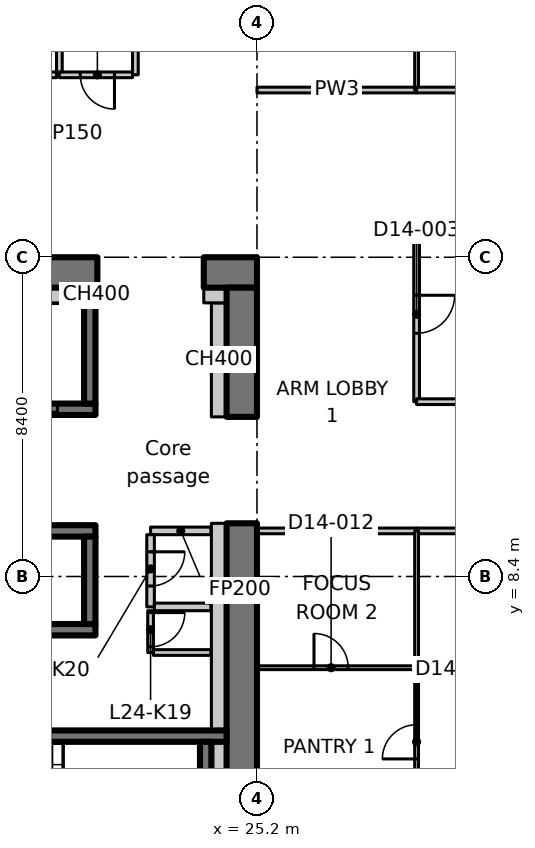
"""IFC4 building model, lengths in metres.
Left out: names, types, materials, properties, quantities, classifications, styles, units other than length and angle.
Written with IfcOpenShell. Run it as: python <this file> out.ifc"""

import sys

from ifc_helpers import new_model, si_unit, direction, frame, frame_2d, origin, place, context, subcontext, project, spatial, polyline, rectangle, outline, extrude, element, fill, save


model = new_model("IFC4")
c1 = context("Model", 3, precision=1e-05, world=origin(), true_north=direction((0.0, 1.0)))
c2 = subcontext(c1, "Body", "Model", "MODEL_VIEW")
j1 = project(units=[si_unit("LENGTHUNIT", "METRE"), si_unit("PLANEANGLEUNIT", "RADIAN")], contexts=[c1])
p1 = place(None, origin())
s1 = spatial("IfcSite", under=j1, at=p1, CompositionType="ELEMENT")
p2 = place(p1, origin())
s2 = spatial("IfcBuilding", under=s1, at=p2, CompositionType="ELEMENT")
p3 = place(p2, frame((0.0, 0.0, 102.5)))
s3 = spatial("IfcBuildingStorey", under=s2, at=p3, CompositionType="ELEMENT", Elevation=102.5)
p4 = place(p3, frame((-1.1, 16.4, 0.0), z_axis=(0.0, 0.0, 1.0), x_axis=(1.0, 0.0, 0.0)))
e1 = element("IfcWall", 1, at=p4, inside=s3, PredefinedType="SHEAR", context=c2, shape_type="SweptSolid", body=[
    extrude(rectangle(XDim=22.1, YDim=0.8, at=frame_2d((11.05, 0.0))), origin(), (0.0, 0.0, 1.0), 3.35),
])
p5 = place(p4, frame((3.15, 0.0, 0.0)))
e2 = element("IfcOpeningElement", 2, at=p5, cuts=e1, PredefinedType="OPENING", context=c2, shape_type="SweptSolid", body=[
    extrude(rectangle(XDim=1.1, YDim=2.3, at=frame_2d((0.55, 1.15))), frame((0.0, 0.41, 0.0), z_axis=(0.0, -1.0, 0.0), x_axis=(1.0, 0.0, 0.0)), (0.0, 0.0, 1.0), 0.82),
])
p6 = place(p3, frame((23.8, 16.4, 0.0), z_axis=(0.0, 0.0, 1.0), x_axis=(1.0, 0.0, 0.0)))
e3 = element("IfcWall", 3, at=p6, inside=s3, PredefinedType="SHEAR", context=c2, shape_type="SweptSolid", body=[
    extrude(rectangle(XDim=1.4, YDim=0.8, at=frame_2d((0.7, 0.0))), origin(), (0.0, 0.0, 1.0), 3.35),
])
p7 = place(p3, frame((24.8, 0.8, 0.0), z_axis=(0.0, 0.0, 1.0), x_axis=(0.0, 1.0, 0.0)))
e4 = element("IfcWall", 4, at=p7, inside=s3, PredefinedType="SHEAR", context=c2, shape_type="SweptSolid", body=[
    extrude(rectangle(XDim=9.0, YDim=0.8, at=frame_2d((4.5, 0.0))), origin(), (0.0, 0.0, 1.0), 3.35),
])
p8 = place(p3, frame((24.8, 12.6, 0.0), z_axis=(0.0, 0.0, 1.0), x_axis=(0.0, 1.0, 0.0)))
e5 = element("IfcWall", 5, at=p8, inside=s3, PredefinedType="SHEAR", context=c2, shape_type="SweptSolid", body=[
    extrude(rectangle(XDim=3.4, YDim=0.8, at=frame_2d((1.7, 0.0))), origin(), (0.0, 0.0, 1.0), 3.35),
])
p9 = place(p3, frame((24.2, 12.6, 0.0), z_axis=(0.0, 0.0, 1.0), x_axis=(0.0, 1.0, 0.0)))
e6 = element("IfcWall", 6, at=p9, inside=s3, PredefinedType="PARTITIONING", context=c2, shape_type="SweptSolid", body=[
    extrude(rectangle(XDim=3.0, YDim=0.4, at=frame_2d((1.5, 0.0))), origin(), (0.0, 0.0, 1.0), 3.35),
])
p10 = place(p3, frame((23.8, 15.8, 0.0), z_axis=(0.0, 0.0, 1.0), x_axis=(1.0, 0.0, 0.0)))
e7 = element("IfcWall", 7, at=p10, inside=s3, PredefinedType="PARTITIONING", context=c2, shape_type="SweptSolid", body=[
    extrude(rectangle(XDim=0.6, YDim=0.4, at=frame_2d((0.3, 0.0))), origin(), (0.0, 0.0, 1.0), 3.35),
])
p11 = place(p3, frame((0.8, 7.0, 0.0), z_axis=(0.0, 0.0, 1.0), x_axis=(1.0, 0.0, 0.0)))
e8 = element("IfcWall", 8, at=p11, inside=s3, PredefinedType="SHEAR", context=c2, shape_type="SweptSolid", body=[
    extrude(rectangle(XDim=20.15, YDim=0.3, at=frame_2d((10.075, 0.0))), origin(), (0.0, 0.0, 1.0), 3.35),
])
p12 = place(p3, frame((0.8, 9.6, 0.0), z_axis=(0.0, 0.0, 1.0), x_axis=(1.0, 0.0, 0.0)))
e9 = element("IfcWall", 9, at=p12, inside=s3, PredefinedType="SHEAR", context=c2, shape_type="SweptSolid", body=[
    extrude(rectangle(XDim=20.15, YDim=0.3, at=frame_2d((10.075, 0.0))), origin(), (0.0, 0.0, 1.0), 3.35),
])
p13 = place(p12, frame((1.25, 0.0, 0.0)))
e10 = element("IfcOpeningElement", 10, at=p13, cuts=e9, PredefinedType="OPENING", context=c2, shape_type="SweptSolid", body=[
    extrude(rectangle(XDim=1.1, YDim=2.3, at=frame_2d((0.55, 1.15))), frame((0.0, 0.16, 0.0), z_axis=(0.0, -1.0, 0.0), x_axis=(1.0, 0.0, 0.0)), (0.0, 0.0, 1.0), 0.32),
])
p14 = place(p12, frame((4.05, 0.0, 0.0)))
e11 = element("IfcOpeningElement", 11, at=p14, cuts=e9, PredefinedType="OPENING", context=c2, shape_type="SweptSolid", body=[
    extrude(rectangle(XDim=1.1, YDim=2.3, at=frame_2d((0.55, 1.15))), frame((0.0, 0.16, 0.0), z_axis=(0.0, -1.0, 0.0), x_axis=(1.0, 0.0, 0.0)), (0.0, 0.0, 1.0), 0.32),
])
p15 = place(p12, frame((6.85, 0.0, 0.0)))
e12 = element("IfcOpeningElement", 12, at=p15, cuts=e9, PredefinedType="OPENING", context=c2, shape_type="SweptSolid", body=[
    extrude(rectangle(XDim=1.1, YDim=2.3, at=frame_2d((0.55, 1.15))), frame((0.0, 0.16, 0.0), z_axis=(0.0, -1.0, 0.0), x_axis=(1.0, 0.0, 0.0)), (0.0, 0.0, 1.0), 0.32),
])
p16 = place(p12, frame((9.65, 0.0, 0.0)))
e13 = element("IfcOpeningElement", 13, at=p16, cuts=e9, PredefinedType="OPENING", context=c2, shape_type="SweptSolid", body=[
    extrude(rectangle(XDim=1.1, YDim=2.3, at=frame_2d((0.55, 1.15))), frame((0.0, 0.16, 0.0), z_axis=(0.0, -1.0, 0.0), x_axis=(1.0, 0.0, 0.0)), (0.0, 0.0, 1.0), 0.32),
])
p17 = place(p12, frame((12.45, 0.0, 0.0)))
e14 = element("IfcOpeningElement", 14, at=p17, cuts=e9, PredefinedType="OPENING", context=c2, shape_type="SweptSolid", body=[
    extrude(rectangle(XDim=1.1, YDim=2.3, at=frame_2d((0.55, 1.15))), frame((0.0, 0.16, 0.0), z_axis=(0.0, -1.0, 0.0), x_axis=(1.0, 0.0, 0.0)), (0.0, 0.0, 1.0), 0.32),
])
p18 = place(p12, frame((15.25, 0.0, 0.0)))
e15 = element("IfcOpeningElement", 15, at=p18, cuts=e9, PredefinedType="OPENING", context=c2, shape_type="SweptSolid", body=[
    extrude(rectangle(XDim=1.1, YDim=2.3, at=frame_2d((0.55, 1.15))), frame((0.0, 0.16, 0.0), z_axis=(0.0, -1.0, 0.0), x_axis=(1.0, 0.0, 0.0)), (0.0, 0.0, 1.0), 0.32),
])
p19 = place(p3, frame((20.8, 7.15, 0.0), z_axis=(0.0, 0.0, 1.0), x_axis=(0.0, 1.0, 0.0)))
e16 = element("IfcWall", 16, at=p19, inside=s3, PredefinedType="SHEAR", context=c2, shape_type="SweptSolid", body=[
    extrude(rectangle(XDim=2.3, YDim=0.3, at=frame_2d((1.15, 0.0))), origin(), (0.0, 0.0, 1.0), 3.35),
])
p20 = place(p3, frame((15.05, 12.8, 0.0), z_axis=(0.0, 0.0, 1.0), x_axis=(1.0, 0.0, 0.0)))
e17 = element("IfcWall", 17, at=p20, inside=s3, PredefinedType="SHEAR", context=c2, shape_type="SweptSolid", body=[
    extrude(rectangle(XDim=5.9, YDim=0.3, at=frame_2d((2.95, 0.0))), origin(), (0.0, 0.0, 1.0), 3.35),
])
p21 = place(p20, frame((3.8, 0.0, 0.0)))
e18 = element("IfcOpeningElement", 18, at=p21, cuts=e17, PredefinedType="OPENING", context=c2, shape_type="SweptSolid", body=[
    extrude(rectangle(XDim=1.1, YDim=2.3, at=frame_2d((0.55, 1.15))), frame((0.0, 0.16, 0.0), z_axis=(0.0, -1.0, 0.0), x_axis=(1.0, 0.0, 0.0)), (0.0, 0.0, 1.0), 0.32),
])
p22 = place(p3, frame((20.8, 12.95, 0.0), z_axis=(0.0, 0.0, 1.0), x_axis=(0.0, 1.0, 0.0)))
e19 = element("IfcWall", 19, at=p22, inside=s3, PredefinedType="SHEAR", context=c2, shape_type="SweptSolid", body=[
    extrude(rectangle(XDim=3.05, YDim=0.3, at=frame_2d((1.525, 0.0))), origin(), (0.0, 0.0, 1.0), 3.35),
])
p23 = place(p3, frame((15.8, 4.2, 0.0), z_axis=(0.0, 0.0, 1.0), x_axis=(1.0, 0.0, 0.0)))
e20 = element("IfcWall", 20, at=p23, inside=s3, PredefinedType="SHEAR", context=c2, shape_type="SweptSolid", body=[
    extrude(rectangle(XDim=8.6, YDim=0.3, at=frame_2d((4.3, 0.0))), origin(), (0.0, 0.0, 1.0), 3.35),
])
p24 = place(p23, frame((0.4, 0.0, 0.0)))
e21 = element("IfcOpeningElement", 21, at=p24, cuts=e20, PredefinedType="OPENING", context=c2, shape_type="SweptSolid", body=[
    extrude(rectangle(XDim=1.0, YDim=2.1, at=frame_2d((0.5, 1.05))), frame((0.0, 0.16, 0.0), z_axis=(0.0, -1.0, 0.0), x_axis=(1.0, 0.0, 0.0)), (0.0, 0.0, 1.0), 0.32),
])
p25 = place(p3, frame((23.85, 1.5, 0.0), z_axis=(0.0, 0.0, 1.0), x_axis=(0.0, 1.0, 0.0)))
e22 = element("IfcWall", 22, at=p25, inside=s3, PredefinedType="SHEAR", context=c2, shape_type="SweptSolid", body=[
    extrude(rectangle(XDim=2.55, YDim=0.3, at=frame_2d((1.275, 0.0))), origin(), (0.0, 0.0, 1.0), 3.35),
])
p26 = place(p3, frame((23.988, 9.6, 0.0), z_axis=(0.0, 0.0, 1.0), x_axis=(-1.0, 0.0, 0.0)))
e23 = element("IfcWall", 23, at=p26, inside=s3, PredefinedType="PARTITIONING", context=c2, shape_type="SweptSolid", body=[
    extrude(rectangle(XDim=1.588, YDim=0.2, at=frame_2d((0.794, 0.0))), origin(), (0.0, 0.0, 1.0), 3.35),
])
p27 = place(p3, frame((22.4, 9.5, 0.0), z_axis=(0.0, 0.0, 1.0), x_axis=(0.0, -1.0, 0.0)))
e24 = element("IfcWall", 24, at=p27, inside=s3, PredefinedType="PARTITIONING", context=c2, shape_type="SweptSolid", body=[
    extrude(rectangle(XDim=1.9, YDim=0.2, at=frame_2d((0.95, 0.0))), origin(), (0.0, 0.0, 1.0), 3.35),
])
p28 = place(p27, frame((0.45, 0.0, 0.0)))
e25 = element("IfcOpeningElement", 25, at=p28, cuts=e24, PredefinedType="OPENING", context=c2, shape_type="SweptSolid", body=[
    extrude(rectangle(XDim=0.9, YDim=2.1, at=frame_2d((0.45, 1.05))), frame((0.0, 0.11, 0.0), z_axis=(0.0, -1.0, 0.0), x_axis=(1.0, 0.0, 0.0)), (0.0, 0.0, 1.0), 0.22),
])
p29 = place(p3, frame((22.5, 7.6, 0.0), z_axis=(0.0, 0.0, 1.0), x_axis=(1.0, 0.0, 0.0)))
e26 = element("IfcWall", 26, at=p29, inside=s3, PredefinedType="PARTITIONING", context=c2, shape_type="SweptSolid", body=[
    extrude(rectangle(XDim=1.488, YDim=0.2, at=frame_2d((0.744, 0.0))), origin(), (0.0, 0.0, 1.0), 3.35),
])
p30 = place(p3, frame((22.0, 23.925, 0.0), z_axis=(0.0, 0.0, 1.0), x_axis=(0.0, -1.0, 0.0)))
e27 = element("IfcWall", 27, at=p30, inside=s3, PredefinedType="PARTITIONING", context=c2, shape_type="SweptSolid", body=[
    extrude(rectangle(XDim=2.325, YDim=0.15, at=frame_2d((1.163, 0.0))), origin(), (0.0, 0.0, 1.0), 3.35),
])
p31 = place(p3, frame((21.925, 21.6, 0.0), z_axis=(0.0, 0.0, 1.0), x_axis=(-1.0, 0.0, 0.0)))
e28 = element("IfcWall", 28, at=p31, inside=s3, PredefinedType="PARTITIONING", context=c2, shape_type="SweptSolid", body=[
    extrude(rectangle(XDim=1.925, YDim=0.15, at=frame_2d((0.962, 0.0))), origin(), (0.0, 0.0, 1.0), 3.35),
])
p32 = place(p31, frame((0.475, 0.0, 0.0)))
e29 = element("IfcOpeningElement", 29, at=p32, cuts=e28, PredefinedType="OPENING", context=c2, shape_type="SweptSolid", body=[
    extrude(rectangle(XDim=0.9, YDim=2.1, at=frame_2d((0.45, 1.05))), frame((0.0, 0.085, 0.0), z_axis=(0.0, -1.0, 0.0), x_axis=(1.0, 0.0, 0.0)), (0.0, 0.0, 1.0), 0.17),
])
p33 = place(p3, frame((20.0, 21.675, 0.0), z_axis=(0.0, 0.0, 1.0), x_axis=(0.0, 1.0, 0.0)))
e30 = element("IfcWall", 30, at=p33, inside=s3, PredefinedType="PARTITIONING", context=c2, shape_type="SweptSolid", body=[
    extrude(rectangle(XDim=2.25, YDim=0.15, at=frame_2d((1.125, 0.0))), origin(), (0.0, 0.0, 1.0), 3.35),
])
p34 = place(p3, frame((19.925, 21.6, 0.0), z_axis=(0.0, 0.0, 1.0), x_axis=(-1.0, 0.0, 0.0)))
e31 = element("IfcWall", 31, at=p34, inside=s3, PredefinedType="PARTITIONING", context=c2, shape_type="SweptSolid", body=[
    extrude(rectangle(XDim=2.325, YDim=0.15, at=frame_2d((1.163, 0.0))), origin(), (0.0, 0.0, 1.0), 3.35),
])
p35 = place(p34, frame((0.675, 0.0, 0.0)))
e32 = element("IfcOpeningElement", 32, at=p35, cuts=e31, PredefinedType="OPENING", context=c2, shape_type="SweptSolid", body=[
    extrude(rectangle(XDim=0.9, YDim=2.1, at=frame_2d((0.45, 1.05))), frame((0.0, 0.085, 0.0), z_axis=(0.0, -1.0, 0.0), x_axis=(1.0, 0.0, 0.0)), (0.0, 0.0, 1.0), 0.17),
])
p36 = place(p3, frame((22.4, 7.5, 0.0), z_axis=(0.0, 0.0, 1.0), x_axis=(0.0, -1.0, 0.0)))
e33 = element("IfcWall", 33, at=p36, inside=s3, PredefinedType="PARTITIONING", context=c2, shape_type="SweptSolid", body=[
    extrude(rectangle(XDim=1.1, YDim=0.15, at=frame_2d((0.55, 0.0))), origin(), (0.0, 0.0, 1.0), 3.35),
])
p37 = place(p36, frame((0.05, 0.0, 0.0)))
e34 = element("IfcOpeningElement", 34, at=p37, cuts=e33, PredefinedType="OPENING", context=c2, shape_type="SweptSolid", body=[
    extrude(rectangle(XDim=0.9, YDim=2.1, at=frame_2d((0.45, 1.05))), frame((0.0, 0.085, 0.0), z_axis=(0.0, -1.0, 0.0), x_axis=(1.0, 0.0, 0.0)), (0.0, 0.0, 1.0), 0.17),
])
p38 = place(p3, frame((22.475, 6.4, 0.0), z_axis=(0.0, 0.0, 1.0), x_axis=(1.0, 0.0, 0.0)))
e35 = element("IfcWall", 35, at=p38, inside=s3, PredefinedType="PARTITIONING", context=c2, shape_type="SweptSolid", body=[
    extrude(rectangle(XDim=1.513, YDim=0.15, at=frame_2d((0.756, 0.0))), origin(), (0.0, 0.0, 1.0), 3.35),
])
p39 = place(p3, frame((18.15, 15.8, 0.0), z_axis=(0.0, 0.0, 1.0), x_axis=(1.0, 0.0, 0.0)))
e36 = element("IfcWall", 36, at=p39, inside=s3, PredefinedType="PARTITIONING", context=c2, shape_type="SweptSolid", body=[
    extrude(rectangle(XDim=2.5, YDim=0.4, at=frame_2d((1.25, 0.0))), origin(), (0.0, 0.0, 1.0), 3.35),
])
p40 = place(p3, frame((20.95, 15.8, 0.0), z_axis=(0.0, 0.0, 1.0), x_axis=(1.0, 0.0, 0.0)))
e37 = element("IfcWall", 37, at=p40, inside=s3, PredefinedType="PARTITIONING", context=c2, shape_type="SweptSolid", body=[
    extrude(rectangle(XDim=0.05, YDim=0.4, at=frame_2d((0.025, 0.0))), origin(), (0.0, 0.0, 1.0), 3.35),
])
p41 = place(p3, frame((24.2, 1.5, 0.0), z_axis=(0.0, 0.0, 1.0), x_axis=(0.0, 1.0, 0.0)))
e38 = element("IfcWall", 38, at=p41, inside=s3, PredefinedType="PARTITIONING", context=c2, shape_type="SweptSolid", body=[
    extrude(rectangle(XDim=2.55, YDim=0.4, at=frame_2d((1.275, 0.0))), origin(), (0.0, 0.0, 1.0), 3.35),
])
p42 = place(p3, frame((24.2, 4.35, 0.0), z_axis=(0.0, 0.0, 1.0), x_axis=(0.0, 1.0, 0.0)))
e39 = element("IfcWall", 39, at=p42, inside=s3, PredefinedType="PARTITIONING", context=c2, shape_type="SweptSolid", body=[
    extrude(rectangle(XDim=5.45, YDim=0.4, at=frame_2d((2.725, 0.0))), origin(), (0.0, 0.0, 1.0), 3.35),
])
p43 = place(p3, frame((25.2, 21.2, 0.0), z_axis=(0.0, 0.0, 1.0), x_axis=(1.0, 0.0, 0.0)))
e40 = element("IfcWall", 40, at=p43, inside=s3, PredefinedType="PARTITIONING", context=c2, shape_type="SweptSolid", body=[
    extrude(rectangle(XDim=4.2, YDim=0.15, at=frame_2d((2.1, 0.0))), origin(), (0.0, 0.0, 1.0), 3.33),
])
p44 = place(p3, frame((29.4, 17.6, 0.0), z_axis=(0.0, 0.0, 1.0), x_axis=(0.0, -1.0, 0.0)))
e41 = element("IfcWall", 41, at=p44, inside=s3, PredefinedType="PARTITIONING", context=c2, shape_type="SweptSolid", body=[
    extrude(rectangle(XDim=4.6, YDim=0.15, at=frame_2d((2.3, 0.0))), origin(), (0.0, 0.0, 1.0), 3.33),
])
p45 = place(p44, frame((1.8, 0.0, 0.0)))
e42 = element("IfcOpeningElement", 42, at=p45, cuts=e41, PredefinedType="OPENING", context=c2, shape_type="SweptSolid", body=[
    extrude(rectangle(XDim=1.0, YDim=2.1, at=frame_2d((0.5, 1.05))), frame((0.0, 0.085, 0.0), z_axis=(0.0, -1.0, 0.0), x_axis=(1.0, 0.0, 0.0)), (0.0, 0.0, 1.0), 0.17),
])
p46 = place(p3, frame((29.4, 9.6, 0.0), z_axis=(0.0, 0.0, 1.0), x_axis=(-1.0, 0.0, 0.0)))
e43 = element("IfcWall", 43, at=p46, inside=s3, PredefinedType="PARTITIONING", context=c2, shape_type="SweptSolid", body=[
    extrude(rectangle(XDim=4.2, YDim=0.15, at=frame_2d((2.1, 0.0))), origin(), (0.0, 0.0, 1.0), 3.33),
])
p47 = place(p3, frame((29.4, 27.429, 0.0), z_axis=(0.0, 0.0, 1.0), x_axis=(0.0, -1.0, 0.0)))
e44 = element("IfcWall", 44, at=p47, inside=s3, PredefinedType="PARTITIONING", context=c2, shape_type="SweptSolid", body=[
    extrude(outline(polyline([(0.0, 0.0), (6.229, 0.0), (6.229, 3.33), (2.679, 3.33), (2.677, 2.98), (1.781, 2.98), (1.779, 3.33), (0.154, 3.33), (0.0, 3.33), (0.0, 0.0)])), frame((0.0, 0.05, 0.0), z_axis=(0.0, -1.0, 0.0), x_axis=(1.0, 0.0, 0.0)), (0.0, 0.0, 1.0), 0.1),
])
p48 = place(p3, frame((29.4, 13.0, 0.0), z_axis=(0.0, 0.0, 1.0), x_axis=(1.0, 0.0, 0.0)))
e45 = element("IfcWall", 45, at=p48, inside=s3, PredefinedType="PARTITIONING", context=c2, shape_type="SweptSolid", body=[
    extrude(rectangle(XDim=4.2, YDim=0.15, at=frame_2d((2.1, 0.0))), origin(), (0.0, 0.0, 1.0), 3.33),
])
p49 = place(p3, frame((37.8, 9.6, 0.0), z_axis=(0.0, 0.0, 1.0), x_axis=(-1.0, 0.0, 0.0)))
e46 = element("IfcWall", 46, at=p49, inside=s3, PredefinedType="PARTITIONING", context=c2, shape_type="SweptSolid", body=[
    extrude(rectangle(XDim=8.4, YDim=0.15, at=frame_2d((4.2, 0.0))), origin(), (0.0, 0.0, 1.0), 3.33),
])
p50 = place(p49, frame((1.8, 0.0, 0.0)))
e47 = element("IfcOpeningElement", 47, at=p50, cuts=e46, PredefinedType="OPENING", context=c2, shape_type="SweptSolid", body=[
    extrude(rectangle(XDim=1.6, YDim=2.1, at=frame_2d((0.8, 1.05))), frame((0.0, 0.085, 0.0), z_axis=(0.0, -1.0, 0.0), x_axis=(1.0, 0.0, 0.0)), (0.0, 0.0, 1.0), 0.17),
])
p51 = place(p3, frame((33.6, 17.6, 0.0), z_axis=(0.0, 0.0, 1.0), x_axis=(-1.0, 0.0, 0.0)))
e48 = element("IfcWall", 48, at=p51, inside=s3, PredefinedType="PARTITIONING", context=c2, shape_type="SweptSolid", body=[
    extrude(rectangle(XDim=4.2, YDim=0.15, at=frame_2d((2.1, 0.0))), origin(), (0.0, 0.0, 1.0), 3.33),
])
p52 = place(p3, frame((29.4, 21.2, 0.0), z_axis=(0.0, 0.0, 1.0), x_axis=(1.0, 0.0, 0.0)))
e49 = element("IfcWall", 49, at=p52, inside=s3, PredefinedType="PARTITIONING", context=c2, shape_type="SweptSolid", body=[
    extrude(rectangle(XDim=8.4, YDim=0.15, at=frame_2d((4.2, 0.0))), origin(), (0.0, 0.0, 1.0), 3.33),
])
p53 = place(p52, frame((3.3, 0.0, 0.0)))
e50 = element("IfcOpeningElement", 50, at=p53, cuts=e49, PredefinedType="OPENING", context=c2, shape_type="SweptSolid", body=[
    extrude(rectangle(XDim=1.6, YDim=2.1, at=frame_2d((0.8, 1.05))), frame((0.0, 0.085, 0.0), z_axis=(0.0, -1.0, 0.0), x_axis=(1.0, 0.0, 0.0)), (0.0, 0.0, 1.0), 0.17),
])
p54 = place(p3, frame((29.4, 1.8, 0.0), z_axis=(0.0, 0.0, 1.0), x_axis=(0.0, 1.0, 0.0)))
e51 = element("IfcWall", 51, at=p54, inside=s3, PredefinedType="PARTITIONING", context=c2, shape_type="SweptSolid", body=[
    extrude(rectangle(XDim=4.2, YDim=0.1, at=frame_2d((2.1, 0.0))), origin(), (0.0, 0.0, 1.0), 3.33),
])
p55 = place(p54, frame((1.8, 0.0, 0.0)))
e52 = element("IfcOpeningElement", 52, at=p55, cuts=e51, PredefinedType="OPENING", context=c2, shape_type="SweptSolid", body=[
    extrude(rectangle(XDim=0.9, YDim=2.1, at=frame_2d((0.45, 1.05))), frame((0.0, 0.06, 0.0), z_axis=(0.0, -1.0, 0.0), x_axis=(1.0, 0.0, 0.0)), (0.0, 0.0, 1.0), 0.12),
])
p56 = place(p3, frame((29.4, 6.0, 0.0), z_axis=(0.0, 0.0, 1.0), x_axis=(0.0, 1.0, 0.0)))
e53 = element("IfcWall", 53, at=p56, inside=s3, PredefinedType="PARTITIONING", context=c2, shape_type="SweptSolid", body=[
    extrude(rectangle(XDim=3.6, YDim=0.1, at=frame_2d((1.8, 0.0))), origin(), (0.0, 0.0, 1.0), 3.33),
])
p57 = place(p3, frame((25.2, 6.0, 0.0), z_axis=(0.0, 0.0, 1.0), x_axis=(1.0, 0.0, 0.0)))
e54 = element("IfcWall", 54, at=p57, inside=s3, PredefinedType="PARTITIONING", context=c2, shape_type="SweptSolid", body=[
    extrude(rectangle(XDim=4.2, YDim=0.1, at=frame_2d((2.1, 0.0))), origin(), (0.0, 0.0, 1.0), 3.33),
])
p58 = place(p57, frame((1.5, 0.0, 0.0)))
e55 = element("IfcOpeningElement", 55, at=p58, cuts=e54, PredefinedType="OPENING", context=c2, shape_type="SweptSolid", body=[
    extrude(rectangle(XDim=0.9, YDim=2.1, at=frame_2d((0.45, 1.05))), frame((0.0, 0.06, 0.0), z_axis=(0.0, -1.0, 0.0), x_axis=(1.0, 0.0, 0.0)), (0.0, 0.0, 1.0), 0.12),
])
p59 = place(p21, origin())
e56 = element("IfcDoor", 56, at=p59, inside=s3, OperationType="SLIDING_TO_LEFT", PredefinedType="DOOR", context=c2, shape_type="SweptSolid", body=[
    extrude(rectangle(XDim=1.1, YDim=2.3, at=frame_2d((0.55, 1.15))), frame((0.0, 0.025, 0.0), z_axis=(0.0, -1.0, 0.0), x_axis=(1.0, 0.0, 0.0)), (0.0, 0.0, 1.0), 0.05),
])
fill(e18, e56)
p60 = place(p37, origin())
e57 = element("IfcDoor", 57, at=p60, inside=s3, OperationType="SINGLE_SWING_LEFT", PredefinedType="DOOR", context=c2, shape_type="SweptSolid", body=[
    extrude(rectangle(XDim=0.9, YDim=2.1, at=frame_2d((0.45, 1.05))), frame((0.0, 0.025, 0.0), z_axis=(0.0, -1.0, 0.0), x_axis=(1.0, 0.0, 0.0)), (0.0, 0.0, 1.0), 0.05),
])
fill(e34, e57)
p61 = place(p28, origin())
e58 = element("IfcDoor", 58, at=p61, inside=s3, OperationType="SINGLE_SWING_RIGHT", PredefinedType="DOOR", context=c2, shape_type="SweptSolid", body=[
    extrude(rectangle(XDim=0.9, YDim=2.1, at=frame_2d((0.45, 1.05))), frame((0.0, 0.025, 0.0), z_axis=(0.0, -1.0, 0.0), x_axis=(1.0, 0.0, 0.0)), (0.0, 0.0, 1.0), 0.05),
])
fill(e25, e58)
p62 = place(p32, origin())
e59 = element("IfcDoor", 59, at=p62, inside=s3, OperationType="SINGLE_SWING_RIGHT", PredefinedType="DOOR", context=c2, shape_type="SweptSolid", body=[
    extrude(rectangle(XDim=0.9, YDim=2.1, at=frame_2d((0.45, 1.05))), frame((0.0, 0.025, 0.0), z_axis=(0.0, -1.0, 0.0), x_axis=(1.0, 0.0, 0.0)), (0.0, 0.0, 1.0), 0.05),
])
fill(e29, e59)
p63 = place(p45, origin())
e60 = element("IfcDoor", 60, at=p63, inside=s3, OperationType="SINGLE_SWING_LEFT", PredefinedType="DOOR", context=c2, shape_type="SweptSolid", body=[
    extrude(rectangle(XDim=1.0, YDim=2.1, at=frame_2d((0.5, 1.05))), frame((0.0, 0.025, 0.0), z_axis=(0.0, -1.0, 0.0), x_axis=(1.0, 0.0, 0.0)), (0.0, 0.0, 1.0), 0.05),
])
fill(e42, e60)
p64 = place(p55, origin())
e61 = element("IfcDoor", 61, at=p64, inside=s3, OperationType="SINGLE_SWING_LEFT", PredefinedType="DOOR", context=c2, shape_type="SweptSolid", body=[
    extrude(rectangle(XDim=0.9, YDim=2.1, at=frame_2d((0.45, 1.05))), frame((0.0, 0.025, 0.0), z_axis=(0.0, -1.0, 0.0), x_axis=(1.0, 0.0, 0.0)), (0.0, 0.0, 1.0), 0.05),
])
fill(e52, e61)
p65 = place(p58, origin())
e62 = element("IfcDoor", 62, at=p65, inside=s3, OperationType="SINGLE_SWING_LEFT", PredefinedType="DOOR", context=c2, shape_type="SweptSolid", body=[
    extrude(rectangle(XDim=0.9, YDim=2.1, at=frame_2d((0.45, 1.05))), frame((0.0, 0.025, 0.0), z_axis=(0.0, -1.0, 0.0), x_axis=(1.0, 0.0, 0.0)), (0.0, 0.0, 1.0), 0.05),
])
fill(e55, e62)
save(model, sys.argv[1])
